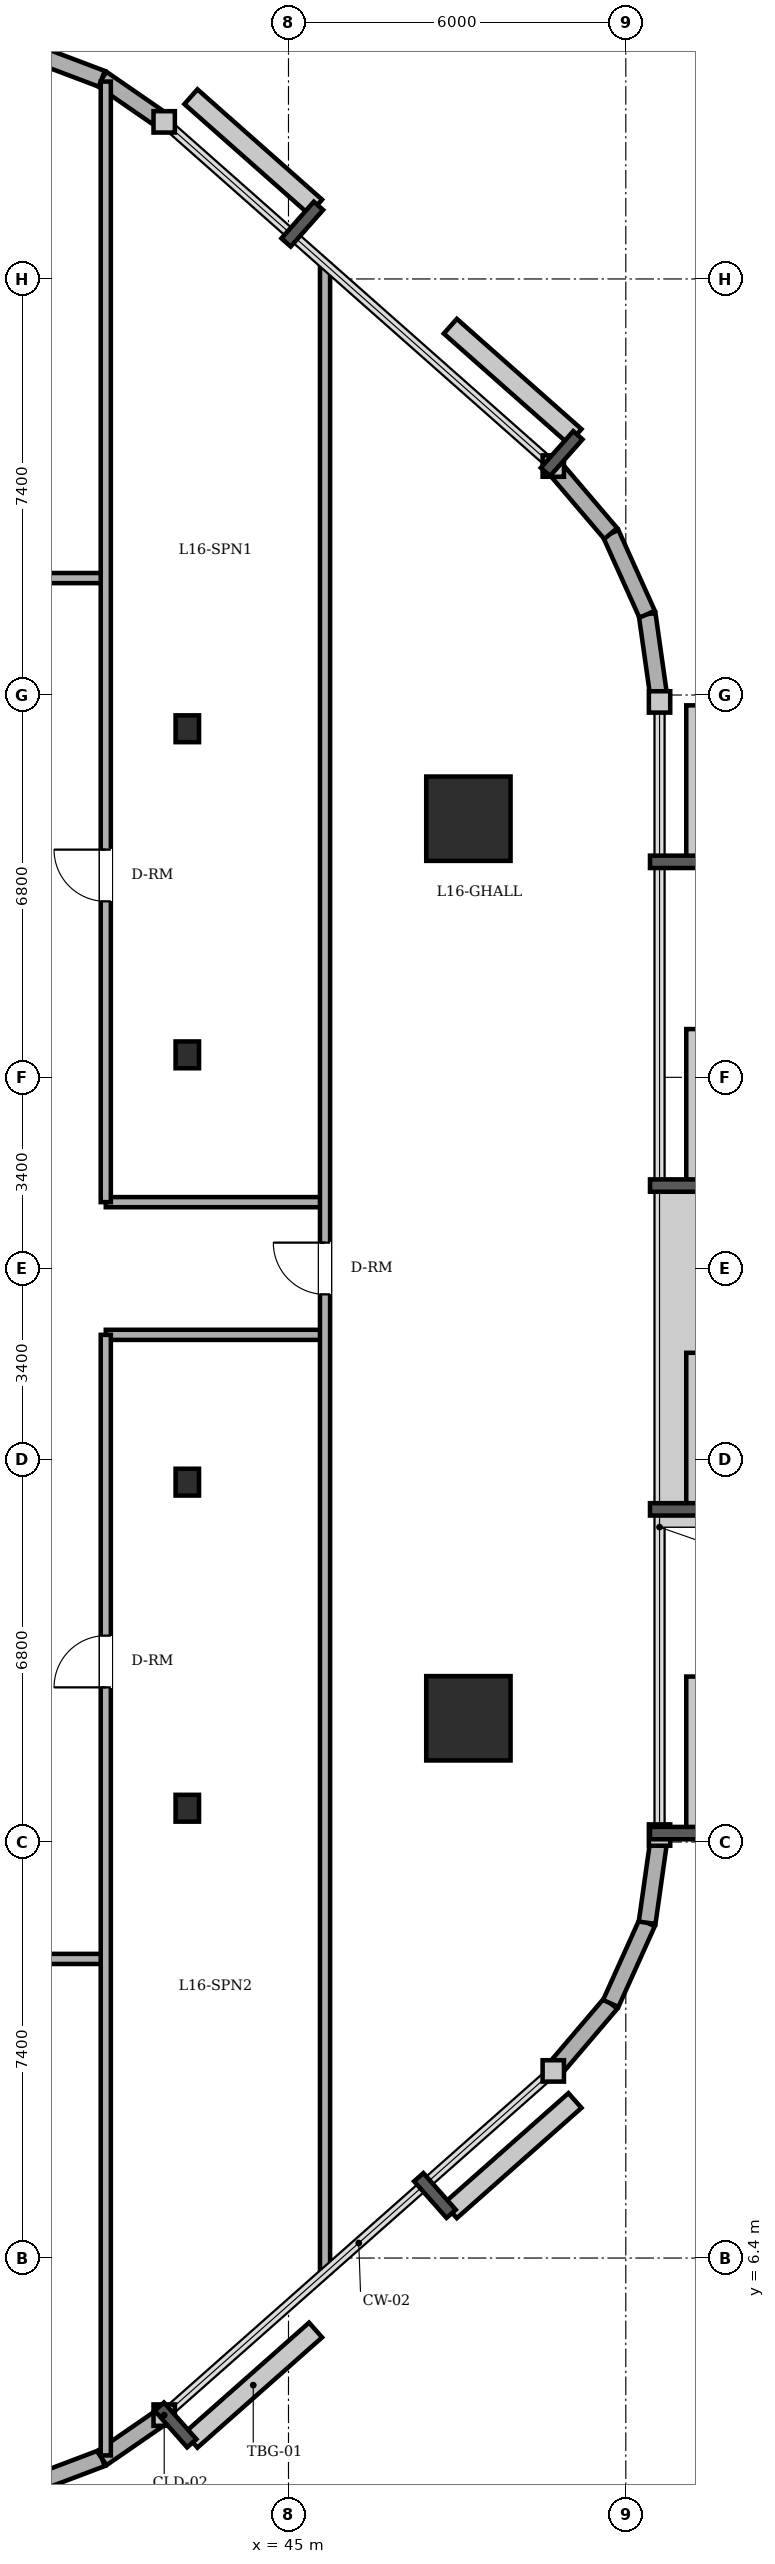
"""IFC4 building model, lengths in metres.
Left out: names, types, materials, properties, quantities, classifications, styles, units other than length and angle.
Written with IfcOpenShell. Run it as: python <this file> out.ifc"""

import sys

from ifc_helpers import new_model, si_unit, direction, frame, frame_2d, origin, origin_2d, place, context, subcontext, project, spatial, rectangle, circle, i_section, extrude, element, fill, save


model = new_model("IFC4")
c1 = context("Model", 3, precision=1e-05, world=origin(), true_north=direction((0.0, 1.0)))
c2 = subcontext(c1, "Body", "Model", "MODEL_VIEW")
j1 = project(units=[si_unit("LENGTHUNIT", "METRE"), si_unit("PLANEANGLEUNIT", "RADIAN")], contexts=[c1])
p1 = place(None, origin())
s1 = spatial("IfcSite", under=j1, at=p1, CompositionType="ELEMENT")
p2 = place(p1, origin())
s2 = spatial("IfcBuilding", under=s1, at=p2, CompositionType="ELEMENT")
p3 = place(p2, frame((0.0, 0.0, 61.2)))
s3 = spatial("IfcBuildingStorey", under=s2, at=p3, CompositionType="ELEMENT", Elevation=61.2)
for number, where, z_axis, x_axis in (
    (1, (48.2, 16.0, 0.0), (0.0, 0.0, 1.0), (1.0, 0.0, 0.0)),
    (2, (48.2, 32.0, 0.0), (0.0, 0.0, 1.0), (1.0, 0.0, 0.0)),
):
    element("IfcColumn", number, at=place(p3, frame(where, z_axis=z_axis, x_axis=x_axis)), inside=s3, PredefinedType="COLUMN", context=c2, shape_type="SweptSolid", body=[
        extrude(circle(Radius=0.75, at=origin_2d()), origin(), (0.0, 0.0, 1.0), 3.6),
    ])
for number, where, z_axis, x_axis in (
    (3, (43.2, 14.4, 0.0), (0.0, 0.0, 1.0), (1.0, 0.0, 0.0)),
    (4, (43.2, 20.2, 0.0), (0.0, 0.0, 1.0), (1.0, 0.0, 0.0)),
    (5, (43.2, 27.8, 0.0), (0.0, 0.0, 1.0), (1.0, 0.0, 0.0)),
    (6, (43.2, 33.6, 0.0), (0.0, 0.0, 1.0), (1.0, 0.0, 0.0)),
):
    element("IfcColumn", number, at=place(p3, frame(where, z_axis=z_axis, x_axis=x_axis)), inside=s3, PredefinedType="COLUMN", context=c2, shape_type="SweptSolid", body=[
        extrude(i_section(OverallWidth=0.417, OverallDepth=0.477, WebThickness=0.036, FlangeThickness=0.057, FilletRadius=0.015, at=origin_2d()), origin(), (0.0, 0.0, 1.0), 3.6),
    ])
p4 = place(p3, frame((40.417, 2.362, 0.0), z_axis=(0.0, 0.0, 1.0), x_axis=(0.935156721165, 0.354234254216, 0.0)))
e7 = element("IfcWall", 7, at=p4, inside=s3, PredefinedType="SOLIDWALL", context=c2, shape_type="SweptSolid", body=[
    extrude(rectangle(XDim=1.349, YDim=0.3, at=frame_2d((0.675, 0.0))), origin(), (0.0, 0.0, 1.0), 3.4),
])
p5 = place(p3, frame((41.679, 2.84, 0.0), z_axis=(0.0, 0.0, 1.0), x_axis=(0.823116500192, 0.567872544777, 0.0)))
e8 = element("IfcWall", 8, at=p5, inside=s3, PredefinedType="SOLIDWALL", context=c2, shape_type="SweptSolid", body=[
    extrude(rectangle(XDim=1.349, YDim=0.3, at=frame_2d((0.674, 0.0))), origin(), (0.0, 0.0, 1.0), 3.4),
])
p6 = place(p3, frame((49.71, 9.728, 0.0), z_axis=(0.0, 0.0, 1.0), x_axis=(0.648389989909, 0.7613083613, 0.0)))
e9 = element("IfcWall", 9, at=p6, inside=s3, PredefinedType="SOLIDWALL", context=c2, shape_type="SweptSolid", body=[
    extrude(rectangle(XDim=1.576, YDim=0.3, at=frame_2d((0.788, 0.0))), origin(), (0.0, 0.0, 1.0), 3.4),
])
p7 = place(p3, frame((50.732, 10.928, 0.0), z_axis=(0.0, 0.0, 1.0), x_axis=(0.410996558744, 0.911636895206, 0.0)))
e10 = element("IfcWall", 10, at=p7, inside=s3, PredefinedType="SOLIDWALL", context=c2, shape_type="SweptSolid", body=[
    extrude(rectangle(XDim=1.574, YDim=0.3, at=frame_2d((0.787, 0.0))), origin(), (0.0, 0.0, 1.0), 3.4),
])
for number, where, z_axis, x_axis in (
    (11, (51.379, 12.363, 0.0), (0.0, 0.0, 1.0), (0.14, 0.99, 0.0)),
    (12, (51.6, 34.077, 0.0), (0.0, 0.0, 1.0), (-0.14, 0.99, 0.0)),
):
    element("IfcWall", number, at=place(p3, frame(where, z_axis=z_axis, x_axis=x_axis)), inside=s3, PredefinedType="SOLIDWALL", context=c2, shape_type="SweptSolid", body=[
        extrude(rectangle(XDim=1.576, YDim=0.3, at=frame_2d((0.788, 0.0))), origin(), (0.0, 0.0, 1.0), 3.4),
    ])
p8 = place(p3, frame((51.379, 35.637, 0.0), z_axis=(0.0, 0.0, 1.0), x_axis=(-0.410996558744, 0.911636895206, 0.0)))
e13 = element("IfcWall", 13, at=p8, inside=s3, PredefinedType="SOLIDWALL", context=c2, shape_type="SweptSolid", body=[
    extrude(rectangle(XDim=1.574, YDim=0.3, at=frame_2d((0.787, 0.0))), origin(), (0.0, 0.0, 1.0), 3.4),
])
p9 = place(p3, frame((50.732, 37.072, 0.0), z_axis=(0.0, 0.0, 1.0), x_axis=(-0.648389989909, 0.7613083613, 0.0)))
e14 = element("IfcWall", 14, at=p9, inside=s3, PredefinedType="SOLIDWALL", context=c2, shape_type="SweptSolid", body=[
    extrude(rectangle(XDim=1.576, YDim=0.3, at=frame_2d((0.788, 0.0))), origin(), (0.0, 0.0, 1.0), 3.4),
])
p10 = place(p3, frame((42.789, 44.394, 0.0), z_axis=(0.0, 0.0, 1.0), x_axis=(-0.823116500192, 0.567872544777, 0.0)))
e15 = element("IfcWall", 15, at=p10, inside=s3, PredefinedType="SOLIDWALL", context=c2, shape_type="SweptSolid", body=[
    extrude(rectangle(XDim=1.349, YDim=0.3, at=frame_2d((0.674, 0.0))), origin(), (0.0, 0.0, 1.0), 3.4),
])
p11 = place(p3, frame((41.679, 45.16, 0.0), z_axis=(0.0, 0.0, 1.0), x_axis=(-0.935156721165, 0.354234254216, 0.0)))
e16 = element("IfcWall", 16, at=p11, inside=s3, PredefinedType="SOLIDWALL", context=c2, shape_type="SweptSolid", body=[
    extrude(rectangle(XDim=1.349, YDim=0.3, at=frame_2d((0.675, 0.0))), origin(), (0.0, 0.0, 1.0), 3.4),
])
p12 = place(p3, frame((3.4, 11.72, 0.0), z_axis=(0.0, 0.0, 1.0), x_axis=(1.0, 0.0, 0.0)))
e17 = element("IfcWall", 17, at=p12, inside=s3, PredefinedType="PARTITIONING", context=c2, shape_type="SweptSolid", body=[
    extrude(rectangle(XDim=38.35, YDim=0.18, at=frame_2d((19.175, 0.0))), origin(), (0.0, 0.0, 1.0), 3.4),
])
p13 = place(p12, frame((21.24, 0.0, 0.0)))
e18 = element("IfcOpeningElement", 18, at=p13, cuts=e17, PredefinedType="OPENING", context=c2, shape_type="SweptSolid", body=[
    extrude(rectangle(XDim=0.92, YDim=2.1, at=frame_2d((0.46, 1.05))), frame((0.0, 0.1, 0.0), z_axis=(0.0, -1.0, 0.0), x_axis=(1.0, 0.0, 0.0)), (0.0, 0.0, 1.0), 0.2),
])
p14 = place(p12, frame((10.74, 0.0, 0.0)))
e19 = element("IfcOpeningElement", 19, at=p14, cuts=e17, PredefinedType="OPENING", context=c2, shape_type="SweptSolid", body=[
    extrude(rectangle(XDim=0.92, YDim=2.1, at=frame_2d((0.46, 1.05))), frame((0.0, 0.1, 0.0), z_axis=(0.0, -1.0, 0.0), x_axis=(1.0, 0.0, 0.0)), (0.0, 0.0, 1.0), 0.2),
])
p15 = place(p12, frame((30.255, 0.0, 0.0)))
e20 = element("IfcOpeningElement", 20, at=p15, cuts=e17, PredefinedType="OPENING", context=c2, shape_type="SweptSolid", body=[
    extrude(rectangle(XDim=0.92, YDim=2.1, at=frame_2d((0.46, 1.05))), frame((0.0, 0.1, 0.0), z_axis=(0.0, -1.0, 0.0), x_axis=(1.0, 0.0, 0.0)), (0.0, 0.0, 1.0), 0.2),
])
for number, where, z_axis, x_axis in (
    (21, (41.75, 22.82, 0.0), (0.0, 0.0, 1.0), (1.0, 0.0, 0.0)),
    (22, (41.75, 25.18, 0.0), (0.0, 0.0, 1.0), (1.0, 0.0, 0.0)),
):
    element("IfcWall", number, at=place(p3, frame(where, z_axis=z_axis, x_axis=x_axis)), inside=s3, PredefinedType="PARTITIONING", context=c2, shape_type="SweptSolid", body=[
        extrude(rectangle(XDim=3.9, YDim=0.18, at=frame_2d((1.95, 0.0))), origin(), (0.0, 0.0, 1.0), 3.4),
    ])
p16 = place(p3, frame((3.4, 36.28, 0.0), z_axis=(0.0, 0.0, 1.0), x_axis=(1.0, 0.0, 0.0)))
e23 = element("IfcWall", 23, at=p16, inside=s3, PredefinedType="PARTITIONING", context=c2, shape_type="SweptSolid", body=[
    extrude(rectangle(XDim=38.35, YDim=0.18, at=frame_2d((19.175, 0.0))), origin(), (0.0, 0.0, 1.0), 3.4),
])
p17 = place(p16, frame((21.05, 0.0, 0.0)))
e24 = element("IfcOpeningElement", 24, at=p17, cuts=e23, PredefinedType="OPENING", context=c2, shape_type="SweptSolid", body=[
    extrude(rectangle(XDim=0.9, YDim=2.1, at=frame_2d((0.45, 1.05))), frame((0.0, 0.1, 0.0), z_axis=(0.0, -1.0, 0.0), x_axis=(1.0, 0.0, 0.0)), (0.0, 0.0, 1.0), 0.2),
])
p18 = place(p16, frame((24.67, 0.0, 0.0)))
e25 = element("IfcOpeningElement", 25, at=p18, cuts=e23, PredefinedType="OPENING", context=c2, shape_type="SweptSolid", body=[
    extrude(rectangle(XDim=0.86, YDim=2.1, at=frame_2d((0.43, 1.05))), frame((0.0, 0.1, 0.0), z_axis=(0.0, -1.0, 0.0), x_axis=(1.0, 0.0, 0.0)), (0.0, 0.0, 1.0), 0.2),
])
p19 = place(p16, frame((10.74, 0.0, 0.0)))
e26 = element("IfcOpeningElement", 26, at=p19, cuts=e23, PredefinedType="OPENING", context=c2, shape_type="SweptSolid", body=[
    extrude(rectangle(XDim=0.92, YDim=2.1, at=frame_2d((0.46, 1.05))), frame((0.0, 0.1, 0.0), z_axis=(0.0, -1.0, 0.0), x_axis=(1.0, 0.0, 0.0)), (0.0, 0.0, 1.0), 0.2),
])
p20 = place(p16, frame((31.915, 0.0, 0.0)))
e27 = element("IfcOpeningElement", 27, at=p20, cuts=e23, PredefinedType="OPENING", context=c2, shape_type="SweptSolid", body=[
    extrude(rectangle(XDim=1.0, YDim=2.15, at=frame_2d((0.5, 1.075))), frame((0.0, 0.1, 0.0), z_axis=(0.0, -1.0, 0.0), x_axis=(1.0, 0.0, 0.0)), (0.0, 0.0, 1.0), 0.2),
])
p21 = place(p3, frame((41.75, 2.889, 0.0), z_axis=(0.0, 0.0, 1.0), x_axis=(0.0, 1.0, 0.0)))
e28 = element("IfcWall", 28, at=p21, inside=s3, PredefinedType="PARTITIONING", context=c2, shape_type="SweptSolid", body=[
    extrude(rectangle(XDim=19.931, YDim=0.18, at=frame_2d((9.966, 0.0))), origin(), (0.0, 0.0, 1.0), 2.782),
])
p22 = place(p21, frame((13.661, 0.0, 0.0)))
e29 = element("IfcOpeningElement", 29, at=p22, cuts=e28, PredefinedType="OPENING", context=c2, shape_type="SweptSolid", body=[
    extrude(rectangle(XDim=0.92, YDim=2.1, at=frame_2d((0.46, 1.05))), frame((0.0, 0.1, 0.0), z_axis=(0.0, -1.0, 0.0), x_axis=(1.0, 0.0, 0.0)), (0.0, 0.0, 1.0), 0.2),
])
p23 = place(p3, frame((41.75, 25.18, 0.0), z_axis=(0.0, 0.0, 1.0), x_axis=(0.0, 1.0, 0.0)))
e30 = element("IfcWall", 30, at=p23, inside=s3, PredefinedType="PARTITIONING", context=c2, shape_type="SweptSolid", body=[
    extrude(rectangle(XDim=19.931, YDim=0.18, at=frame_2d((9.966, 0.0))), origin(), (0.0, 0.0, 1.0), 2.782),
])
p24 = place(p23, frame((5.35, 0.0, 0.0)))
e31 = element("IfcOpeningElement", 31, at=p24, cuts=e30, PredefinedType="OPENING", context=c2, shape_type="SweptSolid", body=[
    extrude(rectangle(XDim=0.92, YDim=2.1, at=frame_2d((0.46, 1.05))), frame((0.0, 0.1, 0.0), z_axis=(0.0, -1.0, 0.0), x_axis=(1.0, 0.0, 0.0)), (0.0, 0.0, 1.0), 0.2),
])
p25 = place(p3, frame((45.65, 6.137, 0.0), z_axis=(0.0, 0.0, 1.0), x_axis=(0.0, 1.0, 0.0)))
e32 = element("IfcWall", 32, at=p25, inside=s3, PredefinedType="PARTITIONING", context=c2, shape_type="SweptSolid", body=[
    extrude(rectangle(XDim=35.726, YDim=0.18, at=frame_2d((17.863, 0.0))), origin(), (0.0, 0.0, 1.0), 3.4),
])
p26 = place(p25, frame((17.403, 0.0, 0.0)))
e33 = element("IfcOpeningElement", 33, at=p26, cuts=e32, PredefinedType="OPENING", context=c2, shape_type="SweptSolid", body=[
    extrude(rectangle(XDim=0.92, YDim=2.1, at=frame_2d((0.46, 1.05))), frame((0.0, 0.1, 0.0), z_axis=(0.0, -1.0, 0.0), x_axis=(1.0, 0.0, 0.0)), (0.0, 0.0, 1.0), 0.2),
])
p27 = place(p24, origin())
e34 = element("IfcDoor", 34, at=p27, inside=s3, OperationType="SINGLE_SWING_RIGHT", PredefinedType="DOOR", context=c2, shape_type="SweptSolid", body=[
    extrude(rectangle(XDim=0.92, YDim=2.1, at=frame_2d((0.46, 1.05))), frame((0.0, 0.025, 0.0), z_axis=(0.0, -1.0, 0.0), x_axis=(1.0, 0.0, 0.0)), (0.0, 0.0, 1.0), 0.05),
])
fill(e31, e34)
p28 = place(p22, origin())
e35 = element("IfcDoor", 35, at=p28, inside=s3, OperationType="SINGLE_SWING_LEFT", PredefinedType="DOOR", context=c2, shape_type="SweptSolid", body=[
    extrude(rectangle(XDim=0.92, YDim=2.1, at=frame_2d((0.46, 1.05))), frame((0.0, 0.025, 0.0), z_axis=(0.0, -1.0, 0.0), x_axis=(1.0, 0.0, 0.0)), (0.0, 0.0, 1.0), 0.05),
])
fill(e29, e35)
p29 = place(p26, origin())
e36 = element("IfcDoor", 36, at=p29, inside=s3, OperationType="SINGLE_SWING_RIGHT", PredefinedType="DOOR", context=c2, shape_type="SweptSolid", body=[
    extrude(rectangle(XDim=0.92, YDim=2.1, at=frame_2d((0.46, 1.05))), frame((0.0, 0.025, 0.0), z_axis=(0.0, -1.0, 0.0), x_axis=(1.0, 0.0, 0.0)), (0.0, 0.0, 1.0), 0.05),
])
fill(e33, e36)
save(model, sys.argv[1])
